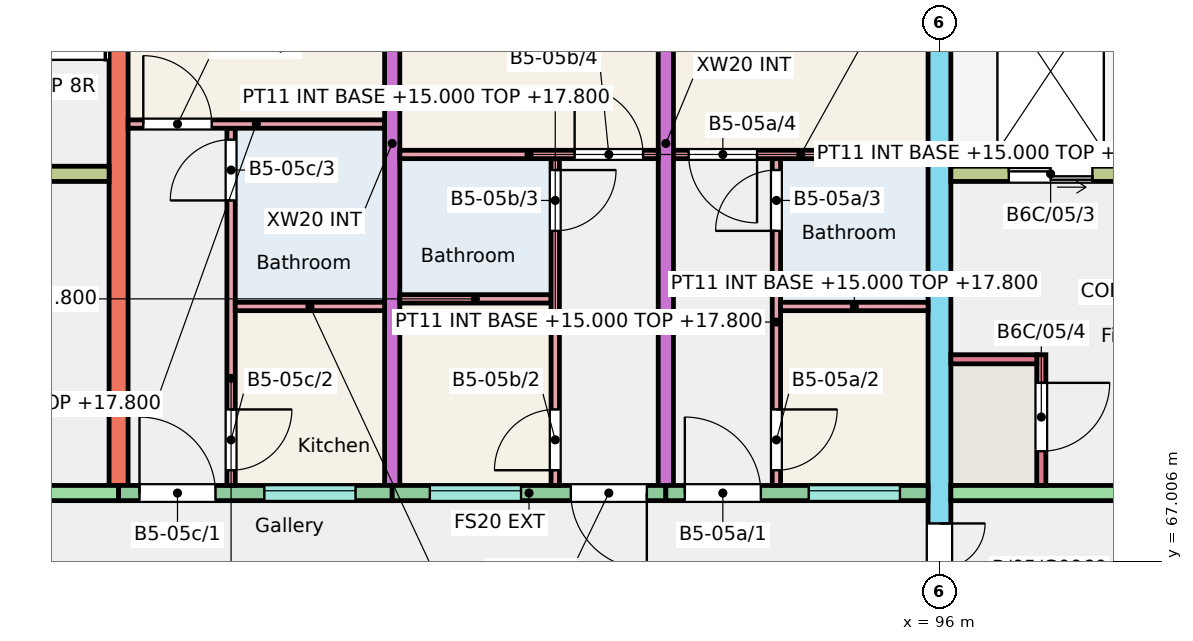
"""IFC4 building model, lengths in metres.
Left out: names, types, materials, properties, quantities, classifications, styles, units other than length and angle.
Written with IfcOpenShell. Run it as: python <this file> out.ifc"""

import sys

from ifc_helpers import new_model, si_unit, direction, frame, frame_2d, origin, place, context, subcontext, project, spatial, rectangle, extrude, element, fill, save


model = new_model("IFC4")
c1 = context("Model", 3, precision=1e-05, world=origin(), true_north=direction((0.0, 1.0)))
c2 = subcontext(c1, "Body", "Model", "MODEL_VIEW")
j1 = project(units=[si_unit("LENGTHUNIT", "METRE"), si_unit("PLANEANGLEUNIT", "RADIAN")], contexts=[c1])
p1 = place(None, origin())
s1 = spatial("IfcSite", under=j1, at=p1, CompositionType="ELEMENT")
p2 = place(p1, origin())
s2 = spatial("IfcBuilding", under=s1, at=p2, CompositionType="ELEMENT")
p3 = place(p2, frame((0.0, 0.0, 15.0)))
s3 = spatial("IfcBuildingStorey", under=s2, at=p3, CompositionType="ELEMENT", Elevation=15.0)
p4 = place(p3, frame((85.2, 68.0, 0.0), z_axis=(0.0, 0.0, 1.0), x_axis=(0.0, 1.0, 0.0)))
e1 = element("IfcWall", 1, at=p4, inside=s3, PredefinedType="SHEAR", context=c2, shape_type="SweptSolid", body=[
    extrude(rectangle(XDim=9.0, YDim=0.25, at=frame_2d((4.5, 0.0))), origin(), (0.0, 0.0, 1.0), 3.0),
])
for number, where, z_axis, x_axis in (
    (2, (88.8, 68.0, 0.0), (0.0, 0.0, 1.0), (0.0, 1.0, 0.0)),
    (3, (92.4, 68.0, 0.0), (0.0, 0.0, 1.0), (0.0, 1.0, 0.0)),
):
    element("IfcWall", number, at=place(p3, frame(where, z_axis=z_axis, x_axis=x_axis)), inside=s3, PredefinedType="SHEAR", context=c2, shape_type="SweptSolid", body=[
        extrude(rectangle(XDim=9.0, YDim=0.2, at=frame_2d((4.5, 0.0))), origin(), (0.0, 0.0, 1.0), 3.0),
    ])
p5 = place(p3, frame((96.0, 66.0, 0.0), z_axis=(0.0, 0.0, 1.0), x_axis=(0.0, 1.0, 0.0)))
e4 = element("IfcWall", 4, at=p5, inside=s3, PredefinedType="SHEAR", context=c2, shape_type="SweptSolid", body=[
    extrude(rectangle(XDim=11.0, YDim=0.3, at=frame_2d((5.5, 0.0))), origin(), (0.0, 0.0, 1.0), 3.0),
])
p6 = place(p5, frame((0.3, 0.0, 0.0)))
e5 = element("IfcOpeningElement", 5, at=p6, cuts=e4, PredefinedType="OPENING", context=c2, shape_type="SweptSolid", body=[
    extrude(rectangle(XDim=1.2, YDim=2.1, at=frame_2d((0.6, 1.05))), frame((0.0, 0.16, 0.0), z_axis=(0.0, -1.0, 0.0), x_axis=(1.0, 0.0, 0.0)), (0.0, 0.0, 1.0), 0.32),
])
p7 = place(p3, frame((79.35, 67.9, 0.0), z_axis=(0.0, 0.0, 1.0), x_axis=(1.0, 0.0, 0.0)))
e6 = element("IfcWall", 6, at=p7, inside=s3, PredefinedType="SHEAR", context=c2, shape_type="SweptSolid", body=[
    extrude(rectangle(XDim=5.85, YDim=0.2, at=frame_2d((2.925, 0.0))), origin(), (0.0, 0.0, 1.0), 3.0),
])
p8 = place(p7, frame((2.312, 0.0, 0.0)))
e7 = element("IfcOpeningElement", 7, at=p8, cuts=e6, PredefinedType="OPENING", context=c2, shape_type="SweptSolid", body=[
    extrude(rectangle(XDim=1.1, YDim=2.1, at=frame_2d((0.55, 1.05))), frame((0.0, 0.11, 0.0), z_axis=(0.0, -1.0, 0.0), x_axis=(1.0, 0.0, 0.0)), (0.0, 0.0, 1.0), 0.22),
])
p9 = place(p3, frame((79.35, 72.1, 0.0), z_axis=(0.0, 0.0, 1.0), x_axis=(1.0, 0.0, 0.0)))
e8 = element("IfcWall", 8, at=p9, inside=s3, PredefinedType="SHEAR", context=c2, shape_type="SweptSolid", body=[
    extrude(rectangle(XDim=5.725, YDim=0.2, at=frame_2d((2.862, 0.0))), origin(), (0.0, 0.0, 1.0), 3.0),
])
p10 = place(p9, frame((3.775, 0.0, 0.0)))
e9 = element("IfcOpeningElement", 9, at=p10, cuts=e8, PredefinedType="OPENING", context=c2, shape_type="SweptSolid", body=[
    extrude(rectangle(XDim=1.0, YDim=2.1, at=frame_2d((0.5, 1.05))), frame((0.0, 0.11, 0.0), z_axis=(0.0, -1.0, 0.0), x_axis=(1.0, 0.0, 0.0)), (0.0, 0.0, 1.0), 0.22),
])
p11 = place(p9, frame((0.762, 0.0, 0.0)))
e10 = element("IfcOpeningElement", 10, at=p11, cuts=e8, PredefinedType="OPENING", context=c2, shape_type="SweptSolid", body=[
    extrude(rectangle(XDim=1.1, YDim=2.1, at=frame_2d((0.55, 1.05))), frame((0.0, 0.11, 0.0), z_axis=(0.0, -1.0, 0.0), x_axis=(1.0, 0.0, 0.0)), (0.0, 0.0, 1.0), 0.22),
])
p12 = place(p3, frame((85.2, 67.9, 0.0), z_axis=(0.0, 0.0, 1.0), x_axis=(1.0, 0.0, 0.0)))
e11 = element("IfcWall", 11, at=p12, inside=s3, PredefinedType="SOLIDWALL", context=c2, shape_type="SweptSolid", body=[
    extrude(rectangle(XDim=3.6, YDim=0.2, at=frame_2d((1.8, 0.0))), origin(), (0.0, 0.0, 1.0), 3.0),
])
p13 = place(p12, frame((1.917, 0.0, 1.1)))
e12 = element("IfcOpeningElement", 12, at=p13, cuts=e11, PredefinedType="OPENING", context=c2, shape_type="SweptSolid", body=[
    extrude(rectangle(XDim=1.2, YDim=1.3, at=frame_2d((0.6, 0.65))), frame((0.0, 0.11, 0.0), z_axis=(0.0, -1.0, 0.0), x_axis=(1.0, 0.0, 0.0)), (0.0, 0.0, 1.0), 0.22),
])
p14 = place(p12, frame((0.275, 0.0, 0.0)))
e13 = element("IfcOpeningElement", 13, at=p14, cuts=e11, PredefinedType="OPENING", context=c2, shape_type="SweptSolid", body=[
    extrude(rectangle(XDim=1.0, YDim=2.1, at=frame_2d((0.5, 1.05))), frame((0.0, 0.11, 0.0), z_axis=(0.0, -1.0, 0.0), x_axis=(1.0, 0.0, 0.0)), (0.0, 0.0, 1.0), 0.22),
])
p15 = place(p3, frame((88.8, 67.9, 0.0), z_axis=(0.0, 0.0, 1.0), x_axis=(1.0, 0.0, 0.0)))
e14 = element("IfcWall", 14, at=p15, inside=s3, PredefinedType="SOLIDWALL", context=c2, shape_type="SweptSolid", body=[
    extrude(rectangle(XDim=3.6, YDim=0.2, at=frame_2d((1.8, 0.0))), origin(), (0.0, 0.0, 1.0), 3.0),
])
p16 = place(p15, frame((0.495, 0.0, 1.1)))
e15 = element("IfcOpeningElement", 15, at=p16, cuts=e14, PredefinedType="OPENING", context=c2, shape_type="SweptSolid", body=[
    extrude(rectangle(XDim=1.2, YDim=1.3, at=frame_2d((0.6, 0.65))), frame((0.0, 0.11, 0.0), z_axis=(0.0, -1.0, 0.0), x_axis=(1.0, 0.0, 0.0)), (0.0, 0.0, 1.0), 0.22),
])
p17 = place(p15, frame((2.35, 0.0, 0.0)))
e16 = element("IfcOpeningElement", 16, at=p17, cuts=e14, PredefinedType="OPENING", context=c2, shape_type="SweptSolid", body=[
    extrude(rectangle(XDim=1.0, YDim=2.1, at=frame_2d((0.5, 1.05))), frame((0.0, 0.11, 0.0), z_axis=(0.0, -1.0, 0.0), x_axis=(1.0, 0.0, 0.0)), (0.0, 0.0, 1.0), 0.22),
])
p18 = place(p3, frame((92.4, 67.9, 0.0), z_axis=(0.0, 0.0, 1.0), x_axis=(1.0, 0.0, 0.0)))
e17 = element("IfcWall", 17, at=p18, inside=s3, PredefinedType="SOLIDWALL", context=c2, shape_type="SweptSolid", body=[
    extrude(rectangle(XDim=3.45, YDim=0.2, at=frame_2d((1.725, 0.0))), origin(), (0.0, 0.0, 1.0), 3.0),
])
p19 = place(p18, frame((1.88, 0.0, 1.1)))
e18 = element("IfcOpeningElement", 18, at=p19, cuts=e17, PredefinedType="OPENING", context=c2, shape_type="SweptSolid", body=[
    extrude(rectangle(XDim=1.2, YDim=1.3, at=frame_2d((0.6, 0.65))), frame((0.0, 0.11, 0.0), z_axis=(0.0, -1.0, 0.0), x_axis=(1.0, 0.0, 0.0)), (0.0, 0.0, 1.0), 0.22),
])
p20 = place(p18, frame((0.25, 0.0, 0.0)))
e19 = element("IfcOpeningElement", 19, at=p20, cuts=e17, PredefinedType="OPENING", context=c2, shape_type="SweptSolid", body=[
    extrude(rectangle(XDim=1.0, YDim=2.1, at=frame_2d((0.5, 1.05))), frame((0.0, 0.11, 0.0), z_axis=(0.0, -1.0, 0.0), x_axis=(1.0, 0.0, 0.0)), (0.0, 0.0, 1.0), 0.22),
])
p21 = place(p3, frame((96.15, 67.9, 0.0), z_axis=(0.0, 0.0, 1.0), x_axis=(1.0, 0.0, 0.0)))
e20 = element("IfcWall", 20, at=p21, inside=s3, PredefinedType="SHEAR", context=c2, shape_type="SweptSolid", body=[
    extrude(rectangle(XDim=5.85, YDim=0.2, at=frame_2d((2.925, 0.0))), origin(), (0.0, 0.0, 1.0), 3.0),
])
p22 = place(p21, frame((2.312, 0.0, 0.0)))
e21 = element("IfcOpeningElement", 21, at=p22, cuts=e20, PredefinedType="OPENING", context=c2, shape_type="SweptSolid", body=[
    extrude(rectangle(XDim=1.1, YDim=2.1, at=frame_2d((0.55, 1.05))), frame((0.0, 0.11, 0.0), z_axis=(0.0, -1.0, 0.0), x_axis=(1.0, 0.0, 0.0)), (0.0, 0.0, 1.0), 0.22),
])
p23 = place(p3, frame((96.15, 72.1, 0.0), z_axis=(0.0, 0.0, 1.0), x_axis=(1.0, 0.0, 0.0)))
e22 = element("IfcWall", 22, at=p23, inside=s3, PredefinedType="SHEAR", context=c2, shape_type="SweptSolid", body=[
    extrude(rectangle(XDim=5.725, YDim=0.2, at=frame_2d((2.863, 0.0))), origin(), (0.0, 0.0, 1.0), 3.0),
])
p24 = place(p23, frame((3.775, 0.0, 0.0)))
e23 = element("IfcOpeningElement", 23, at=p24, cuts=e22, PredefinedType="OPENING", context=c2, shape_type="SweptSolid", body=[
    extrude(rectangle(XDim=1.0, YDim=2.1, at=frame_2d((0.5, 1.05))), frame((0.0, 0.11, 0.0), z_axis=(0.0, -1.0, 0.0), x_axis=(1.0, 0.0, 0.0)), (0.0, 0.0, 1.0), 0.22),
])
p25 = place(p23, frame((0.762, 0.0, 0.0)))
e24 = element("IfcOpeningElement", 24, at=p25, cuts=e22, PredefinedType="OPENING", context=c2, shape_type="SweptSolid", body=[
    extrude(rectangle(XDim=1.1, YDim=2.1, at=frame_2d((0.55, 1.05))), frame((0.0, 0.11, 0.0), z_axis=(0.0, -1.0, 0.0), x_axis=(1.0, 0.0, 0.0)), (0.0, 0.0, 1.0), 0.22),
])
p26 = place(p3, frame((97.34, 68.0, 0.0), z_axis=(0.0, 0.0, 1.0), x_axis=(0.0, 1.0, 0.0)))
e25 = element("IfcWall", 25, at=p26, inside=s3, PredefinedType="SHEAR", context=c2, shape_type="SweptSolid", body=[
    extrude(rectangle(XDim=1.72, YDim=0.12, at=frame_2d((0.86, 0.0))), origin(), (0.0, 0.0, 1.0), 3.0),
])
p27 = place(p26, frame((0.45, 0.0, 0.0)))
e26 = element("IfcOpeningElement", 26, at=p27, cuts=e25, PredefinedType="OPENING", context=c2, shape_type="SweptSolid", body=[
    extrude(rectangle(XDim=0.9, YDim=2.1, at=frame_2d((0.45, 1.05))), frame((0.0, 0.07, 0.0), z_axis=(0.0, -1.0, 0.0), x_axis=(1.0, 0.0, 0.0)), (0.0, 0.0, 1.0), 0.14),
])
p28 = place(p3, frame((96.15, 69.66, 0.0), z_axis=(0.0, 0.0, 1.0), x_axis=(1.0, 0.0, 0.0)))
e27 = element("IfcWall", 27, at=p28, inside=s3, PredefinedType="SHEAR", context=c2, shape_type="SweptSolid", body=[
    extrude(rectangle(XDim=1.13, YDim=0.12, at=frame_2d((0.565, 0.0))), origin(), (0.0, 0.0, 1.0), 3.0),
])
p29 = place(p3, frame((93.855, 68.0, 0.0), z_axis=(0.0, 0.0, 1.0), x_axis=(0.0, 1.0, 0.0)))
e28 = element("IfcWall", 28, at=p29, inside=s3, PredefinedType="PARTITIONING", context=c2, shape_type="SweptSolid", body=[
    extrude(rectangle(XDim=4.3, YDim=0.11, at=frame_2d((2.15, 0.0))), origin(), (0.0, 0.0, 1.0), 2.8),
])
p30 = place(p29, frame((0.2, 0.0, 0.0)))
e29 = element("IfcOpeningElement", 29, at=p30, cuts=e28, PredefinedType="OPENING", context=c2, shape_type="SweptSolid", body=[
    extrude(rectangle(XDim=0.8, YDim=2.1, at=frame_2d((0.4, 1.05))), frame((0.0, 0.065, 0.0), z_axis=(0.0, -1.0, 0.0), x_axis=(1.0, 0.0, 0.0)), (0.0, 0.0, 1.0), 0.13),
])
p31 = place(p29, frame((3.35, 0.0, 0.0)))
e30 = element("IfcOpeningElement", 30, at=p31, cuts=e28, PredefinedType="OPENING", context=c2, shape_type="SweptSolid", body=[
    extrude(rectangle(XDim=0.8, YDim=2.1, at=frame_2d((0.4, 1.05))), frame((0.0, 0.065, 0.0), z_axis=(0.0, -1.0, 0.0), x_axis=(1.0, 0.0, 0.0)), (0.0, 0.0, 1.0), 0.13),
])
p32 = place(p3, frame((93.91, 70.355, 0.0), z_axis=(0.0, 0.0, 1.0), x_axis=(1.0, 0.0, 0.0)))
e31 = element("IfcWall", 31, at=p32, inside=s3, PredefinedType="PARTITIONING", context=c2, shape_type="SweptSolid", body=[
    extrude(rectangle(XDim=1.94, YDim=0.11, at=frame_2d((0.97, 0.0))), origin(), (0.0, 0.0, 1.0), 2.8),
])
p33 = place(p3, frame((92.5, 72.355, 0.0), z_axis=(0.0, 0.0, 1.0), x_axis=(1.0, 0.0, 0.0)))
e32 = element("IfcWall", 32, at=p33, inside=s3, PredefinedType="PARTITIONING", context=c2, shape_type="SweptSolid", body=[
    extrude(rectangle(XDim=3.35, YDim=0.11, at=frame_2d((1.675, 0.0))), origin(), (0.0, 0.0, 1.0), 2.8),
])
p34 = place(p33, frame((0.2, 0.0, 0.0)))
e33 = element("IfcOpeningElement", 33, at=p34, cuts=e32, PredefinedType="OPENING", context=c2, shape_type="SweptSolid", body=[
    extrude(rectangle(XDim=0.9, YDim=2.1, at=frame_2d((0.45, 1.05))), frame((0.0, 0.065, 0.0), z_axis=(0.0, -1.0, 0.0), x_axis=(1.0, 0.0, 0.0)), (0.0, 0.0, 1.0), 0.13),
])
p35 = place(p3, frame((88.9, 70.455, 0.0), z_axis=(0.0, 0.0, 1.0), x_axis=(1.0, 0.0, 0.0)))
e34 = element("IfcWall", 34, at=p35, inside=s3, PredefinedType="PARTITIONING", context=c2, shape_type="SweptSolid", body=[
    extrude(rectangle(XDim=1.99, YDim=0.11, at=frame_2d((0.995, 0.0))), origin(), (0.0, 0.0, 1.0), 2.8),
])
p36 = place(p3, frame((90.945, 68.0, 0.0), z_axis=(0.0, 0.0, 1.0), x_axis=(0.0, 1.0, 0.0)))
e35 = element("IfcWall", 35, at=p36, inside=s3, PredefinedType="PARTITIONING", context=c2, shape_type="SweptSolid", body=[
    extrude(rectangle(XDim=4.3, YDim=0.11, at=frame_2d((2.15, 0.0))), origin(), (0.0, 0.0, 1.0), 2.8),
])
p37 = place(p36, frame((0.2, 0.0, 0.0)))
e36 = element("IfcOpeningElement", 36, at=p37, cuts=e35, PredefinedType="OPENING", context=c2, shape_type="SweptSolid", body=[
    extrude(rectangle(XDim=0.8, YDim=2.1, at=frame_2d((0.4, 1.05))), frame((0.0, 0.065, 0.0), z_axis=(0.0, -1.0, 0.0), x_axis=(1.0, 0.0, 0.0)), (0.0, 0.0, 1.0), 0.13),
])
p38 = place(p36, frame((3.35, 0.0, 0.0)))
e37 = element("IfcOpeningElement", 37, at=p38, cuts=e35, PredefinedType="OPENING", context=c2, shape_type="SweptSolid", body=[
    extrude(rectangle(XDim=0.8, YDim=2.1, at=frame_2d((0.4, 1.05))), frame((0.0, 0.065, 0.0), z_axis=(0.0, -1.0, 0.0), x_axis=(1.0, 0.0, 0.0)), (0.0, 0.0, 1.0), 0.13),
])
p39 = place(p3, frame((88.9, 72.355, 0.0), z_axis=(0.0, 0.0, 1.0), x_axis=(1.0, 0.0, 0.0)))
e38 = element("IfcWall", 38, at=p39, inside=s3, PredefinedType="PARTITIONING", context=c2, shape_type="SweptSolid", body=[
    extrude(rectangle(XDim=3.4, YDim=0.11, at=frame_2d((1.7, 0.0))), origin(), (0.0, 0.0, 1.0), 2.8),
])
p40 = place(p39, frame((2.3, 0.0, 0.0)))
e39 = element("IfcOpeningElement", 39, at=p40, cuts=e38, PredefinedType="OPENING", context=c2, shape_type="SweptSolid", body=[
    extrude(rectangle(XDim=0.9, YDim=2.1, at=frame_2d((0.45, 1.05))), frame((0.0, 0.065, 0.0), z_axis=(0.0, -1.0, 0.0), x_axis=(1.0, 0.0, 0.0)), (0.0, 0.0, 1.0), 0.13),
])
p41 = place(p3, frame((86.68, 68.0, 0.0), z_axis=(0.0, 0.0, 1.0), x_axis=(0.0, 1.0, 0.0)))
e40 = element("IfcWall", 40, at=p41, inside=s3, PredefinedType="PARTITIONING", context=c2, shape_type="SweptSolid", body=[
    extrude(rectangle(XDim=4.7, YDim=0.11, at=frame_2d((2.35, 0.0))), origin(), (0.0, 0.0, 1.0), 2.8),
])
p42 = place(p41, frame((0.2, 0.0, 0.0)))
e41 = element("IfcOpeningElement", 41, at=p42, cuts=e40, PredefinedType="OPENING", context=c2, shape_type="SweptSolid", body=[
    extrude(rectangle(XDim=0.8, YDim=2.1, at=frame_2d((0.4, 1.05))), frame((0.0, 0.065, 0.0), z_axis=(0.0, -1.0, 0.0), x_axis=(1.0, 0.0, 0.0)), (0.0, 0.0, 1.0), 0.13),
])
p43 = place(p41, frame((3.75, 0.0, 0.0)))
e42 = element("IfcOpeningElement", 42, at=p43, cuts=e40, PredefinedType="OPENING", context=c2, shape_type="SweptSolid", body=[
    extrude(rectangle(XDim=0.8, YDim=2.1, at=frame_2d((0.4, 1.05))), frame((0.0, 0.065, 0.0), z_axis=(0.0, -1.0, 0.0), x_axis=(1.0, 0.0, 0.0)), (0.0, 0.0, 1.0), 0.13),
])
p44 = place(p3, frame((86.735, 70.355, 0.0), z_axis=(0.0, 0.0, 1.0), x_axis=(1.0, 0.0, 0.0)))
e43 = element("IfcWall", 43, at=p44, inside=s3, PredefinedType="PARTITIONING", context=c2, shape_type="SweptSolid", body=[
    extrude(rectangle(XDim=1.965, YDim=0.11, at=frame_2d((0.982, 0.0))), origin(), (0.0, 0.0, 1.0), 2.8),
])
p45 = place(p3, frame((85.325, 72.755, 0.0), z_axis=(0.0, 0.0, 1.0), x_axis=(1.0, 0.0, 0.0)))
e44 = element("IfcWall", 44, at=p45, inside=s3, PredefinedType="PARTITIONING", context=c2, shape_type="SweptSolid", body=[
    extrude(rectangle(XDim=3.375, YDim=0.11, at=frame_2d((1.688, 0.0))), origin(), (0.0, 0.0, 1.0), 2.8),
])
p46 = place(p45, frame((0.2, 0.0, 0.0)))
e45 = element("IfcOpeningElement", 45, at=p46, cuts=e44, PredefinedType="OPENING", context=c2, shape_type="SweptSolid", body=[
    extrude(rectangle(XDim=0.9, YDim=2.1, at=frame_2d((0.45, 1.05))), frame((0.0, 0.065, 0.0), z_axis=(0.0, -1.0, 0.0), x_axis=(1.0, 0.0, 0.0)), (0.0, 0.0, 1.0), 0.13),
])
p47 = place(p19, origin())
e46 = element("IfcWindow", 46, at=p47, inside=s3, PartitioningType="SINGLE_PANEL", PredefinedType="WINDOW", context=c2, shape_type="SweptSolid", body=[
    extrude(rectangle(XDim=1.2, YDim=1.3, at=frame_2d((0.6, 0.65))), frame((0.0, 0.06, 0.0), z_axis=(0.0, -1.0, 0.0), x_axis=(1.0, 0.0, 0.0)), (0.0, 0.0, 1.0), 0.06),
])
fill(e18, e46)
p48 = place(p16, origin())
e47 = element("IfcWindow", 47, at=p48, inside=s3, PartitioningType="SINGLE_PANEL", PredefinedType="WINDOW", context=c2, shape_type="SweptSolid", body=[
    extrude(rectangle(XDim=1.2, YDim=1.3, at=frame_2d((0.6, 0.65))), frame((0.0, 0.06, 0.0), z_axis=(0.0, -1.0, 0.0), x_axis=(1.0, 0.0, 0.0)), (0.0, 0.0, 1.0), 0.06),
])
fill(e15, e47)
p49 = place(p13, origin())
e48 = element("IfcWindow", 48, at=p49, inside=s3, PartitioningType="SINGLE_PANEL", PredefinedType="WINDOW", context=c2, shape_type="SweptSolid", body=[
    extrude(rectangle(XDim=1.2, YDim=1.3, at=frame_2d((0.6, 0.65))), frame((0.0, 0.06, 0.0), z_axis=(0.0, -1.0, 0.0), x_axis=(1.0, 0.0, 0.0)), (0.0, 0.0, 1.0), 0.06),
])
fill(e12, e48)
p50 = place(p20, origin())
e49 = element("IfcDoor", 49, at=p50, inside=s3, OperationType="SINGLE_SWING_LEFT", PredefinedType="DOOR", context=c2, shape_type="SweptSolid", body=[
    extrude(rectangle(XDim=1.0, YDim=2.1, at=frame_2d((0.5, 1.05))), frame((0.0, 0.025, 0.0), z_axis=(0.0, -1.0, 0.0), x_axis=(1.0, 0.0, 0.0)), (0.0, 0.0, 1.0), 0.05),
])
fill(e19, e49)
p51 = place(p30, origin())
e50 = element("IfcDoor", 50, at=p51, inside=s3, OperationType="SINGLE_SWING_RIGHT", PredefinedType="DOOR", context=c2, shape_type="SweptSolid", body=[
    extrude(rectangle(XDim=0.8, YDim=2.1, at=frame_2d((0.4, 1.05))), frame((0.0, 0.025, 0.0), z_axis=(0.0, -1.0, 0.0), x_axis=(1.0, 0.0, 0.0)), (0.0, 0.0, 1.0), 0.05),
])
fill(e29, e50)
p52 = place(p31, origin())
e51 = element("IfcDoor", 51, at=p52, inside=s3, OperationType="SINGLE_SWING_LEFT", PredefinedType="DOOR", context=c2, shape_type="SweptSolid", body=[
    extrude(rectangle(XDim=0.8, YDim=2.1, at=frame_2d((0.4, 1.05))), frame((0.0, 0.025, 0.0), z_axis=(0.0, -1.0, 0.0), x_axis=(1.0, 0.0, 0.0)), (0.0, 0.0, 1.0), 0.05),
])
fill(e30, e51)
p53 = place(p34, origin())
e52 = element("IfcDoor", 52, at=p53, inside=s3, OperationType="SINGLE_SWING_RIGHT", PredefinedType="DOOR", context=c2, shape_type="SweptSolid", body=[
    extrude(rectangle(XDim=0.9, YDim=2.1, at=frame_2d((0.45, 1.05))), frame((0.0, 0.025, 0.0), z_axis=(0.0, -1.0, 0.0), x_axis=(1.0, 0.0, 0.0)), (0.0, 0.0, 1.0), 0.05),
])
fill(e33, e52)
p54 = place(p17, origin())
e53 = element("IfcDoor", 53, at=p54, inside=s3, OperationType="SINGLE_SWING_RIGHT", PredefinedType="DOOR", context=c2, shape_type="SweptSolid", body=[
    extrude(rectangle(XDim=1.0, YDim=2.1, at=frame_2d((0.5, 1.05))), frame((0.0, 0.025, 0.0), z_axis=(0.0, -1.0, 0.0), x_axis=(1.0, 0.0, 0.0)), (0.0, 0.0, 1.0), 0.05),
])
fill(e16, e53)
p55 = place(p37, origin())
e54 = element("IfcDoor", 54, at=p55, inside=s3, OperationType="SINGLE_SWING_LEFT", PredefinedType="DOOR", context=c2, shape_type="SweptSolid", body=[
    extrude(rectangle(XDim=0.8, YDim=2.1, at=frame_2d((0.4, 1.05))), frame((0.0, 0.025, 0.0), z_axis=(0.0, -1.0, 0.0), x_axis=(1.0, 0.0, 0.0)), (0.0, 0.0, 1.0), 0.05),
])
fill(e36, e54)
p56 = place(p38, origin())
e55 = element("IfcDoor", 55, at=p56, inside=s3, OperationType="SINGLE_SWING_RIGHT", PredefinedType="DOOR", context=c2, shape_type="SweptSolid", body=[
    extrude(rectangle(XDim=0.8, YDim=2.1, at=frame_2d((0.4, 1.05))), frame((0.0, 0.025, 0.0), z_axis=(0.0, -1.0, 0.0), x_axis=(1.0, 0.0, 0.0)), (0.0, 0.0, 1.0), 0.05),
])
fill(e37, e55)
p57 = place(p40, origin())
e56 = element("IfcDoor", 56, at=p57, inside=s3, OperationType="SINGLE_SWING_LEFT", PredefinedType="DOOR", context=c2, shape_type="SweptSolid", body=[
    extrude(rectangle(XDim=0.9, YDim=2.1, at=frame_2d((0.45, 1.05))), frame((0.0, 0.025, 0.0), z_axis=(0.0, -1.0, 0.0), x_axis=(1.0, 0.0, 0.0)), (0.0, 0.0, 1.0), 0.05),
])
fill(e39, e56)
p58 = place(p14, origin())
e57 = element("IfcDoor", 57, at=p58, inside=s3, OperationType="SINGLE_SWING_LEFT", PredefinedType="DOOR", context=c2, shape_type="SweptSolid", body=[
    extrude(rectangle(XDim=1.0, YDim=2.1, at=frame_2d((0.5, 1.05))), frame((0.0, 0.025, 0.0), z_axis=(0.0, -1.0, 0.0), x_axis=(1.0, 0.0, 0.0)), (0.0, 0.0, 1.0), 0.05),
])
fill(e13, e57)
p59 = place(p42, origin())
e58 = element("IfcDoor", 58, at=p59, inside=s3, OperationType="SINGLE_SWING_RIGHT", PredefinedType="DOOR", context=c2, shape_type="SweptSolid", body=[
    extrude(rectangle(XDim=0.8, YDim=2.1, at=frame_2d((0.4, 1.05))), frame((0.0, 0.025, 0.0), z_axis=(0.0, -1.0, 0.0), x_axis=(1.0, 0.0, 0.0)), (0.0, 0.0, 1.0), 0.05),
])
fill(e41, e58)
p60 = place(p43, origin())
e59 = element("IfcDoor", 59, at=p60, inside=s3, OperationType="SINGLE_SWING_LEFT", PredefinedType="DOOR", context=c2, shape_type="SweptSolid", body=[
    extrude(rectangle(XDim=0.8, YDim=2.1, at=frame_2d((0.4, 1.05))), frame((0.0, 0.025, 0.0), z_axis=(0.0, -1.0, 0.0), x_axis=(1.0, 0.0, 0.0)), (0.0, 0.0, 1.0), 0.05),
])
fill(e42, e59)
p61 = place(p46, origin())
e60 = element("IfcDoor", 60, at=p61, inside=s3, OperationType="SINGLE_SWING_LEFT", PredefinedType="DOOR", context=c2, shape_type="SweptSolid", body=[
    extrude(rectangle(XDim=0.9, YDim=2.1, at=frame_2d((0.45, 1.05))), frame((0.0, 0.025, 0.0), z_axis=(0.0, -1.0, 0.0), x_axis=(1.0, 0.0, 0.0)), (0.0, 0.0, 1.0), 0.05),
])
fill(e45, e60)
p62 = place(p25, origin())
e61 = element("IfcDoor", 61, at=p62, inside=s3, OperationType="DOUBLE_DOOR_SLIDING", PredefinedType="DOOR", context=c2, shape_type="SweptSolid", body=[
    extrude(rectangle(XDim=1.1, YDim=2.1, at=frame_2d((0.55, 1.05))), frame((0.0, 0.025, 0.0), z_axis=(0.0, -1.0, 0.0), x_axis=(1.0, 0.0, 0.0)), (0.0, 0.0, 1.0), 0.05),
])
fill(e24, e61)
p63 = place(p27, origin())
e62 = element("IfcDoor", 62, at=p63, inside=s3, OperationType="SINGLE_SWING_RIGHT", PredefinedType="DOOR", context=c2, shape_type="SweptSolid", body=[
    extrude(rectangle(XDim=0.9, YDim=2.1, at=frame_2d((0.45, 1.05))), frame((0.0, 0.025, 0.0), z_axis=(0.0, -1.0, 0.0), x_axis=(1.0, 0.0, 0.0)), (0.0, 0.0, 1.0), 0.05),
])
fill(e26, e62)
p64 = place(p6, origin())
e63 = element("IfcDoor", 63, at=p64, inside=s3, OperationType="DOUBLE_DOOR_SINGLE_SWING", PredefinedType="DOOR", context=c2, shape_type="SweptSolid", body=[
    extrude(rectangle(XDim=1.2, YDim=2.1, at=frame_2d((0.6, 1.05))), frame((0.0, 0.025, 0.0), z_axis=(0.0, -1.0, 0.0), x_axis=(1.0, 0.0, 0.0)), (0.0, 0.0, 1.0), 0.05),
])
fill(e5, e63)
save(model, sys.argv[1])
